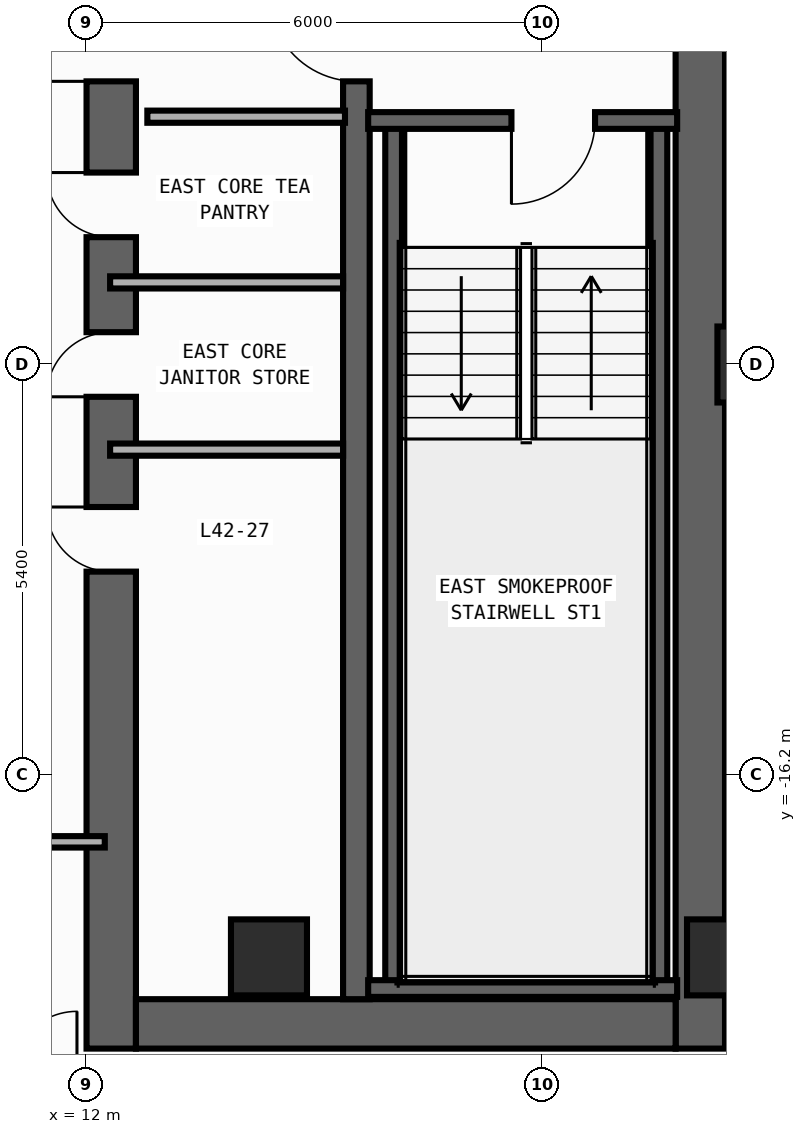
"""IFC4 building model, lengths in metres.
Left out: names, types, materials, properties, quantities, classifications, styles, units other than length and angle.
Written with IfcOpenShell. Run it as: python <this file> out.ifc"""

import sys

from ifc_helpers import new_model, si_unit, direction, frame, frame_2d, origin, origin_2d, place, context, subcontext, project, spatial, rectangle, extrude, element, fill, save


model = new_model("IFC4")
c1 = context("Model", 3, precision=1e-05, world=origin(), true_north=direction((0.0, 1.0)))
c2 = subcontext(c1, "Body", "Model", "MODEL_VIEW")
j1 = project(units=[si_unit("LENGTHUNIT", "METRE"), si_unit("PLANEANGLEUNIT", "RADIAN")], contexts=[c1])
p1 = place(None, origin())
s1 = spatial("IfcSite", under=j1, at=p1, CompositionType="ELEMENT")
p2 = place(p1, origin())
s2 = spatial("IfcBuilding", under=s1, at=p2, CompositionType="ELEMENT")
p3 = place(p2, frame((0.0, 0.0, 184.0)))
s3 = spatial("IfcBuildingStorey", under=s2, at=p3, CompositionType="ELEMENT", Elevation=184.0)
p4 = place(p3, frame((12.325, -19.8, 0.0), z_axis=(0.0, 0.0, 1.0), x_axis=(0.0, 1.0, 0.0)))
e1 = element("IfcWall", 1, at=p4, inside=s3, PredefinedType="SHEAR", context=c2, shape_type="SweptSolid", body=[
    extrude(rectangle(XDim=27.0, YDim=0.65, at=frame_2d((13.5, 0.0))), origin(), (0.0, 0.0, 1.0), 3.54),
])
p5 = place(p4, frame((23.05, 0.0, 0.0)))
e2 = element("IfcOpeningElement", 2, at=p5, cuts=e1, PredefinedType="OPENING", context=c2, shape_type="SweptSolid", body=[
    extrude(rectangle(XDim=1.1, YDim=2.2, at=frame_2d((0.55, 1.1))), frame((0.0, 0.335, 0.0), z_axis=(0.0, -1.0, 0.0), x_axis=(1.0, 0.0, 0.0)), (0.0, 0.0, 1.0), 0.67),
])
p6 = place(p4, frame((19.85, 0.0, 0.0)))
e3 = element("IfcOpeningElement", 3, at=p6, cuts=e1, PredefinedType="OPENING", context=c2, shape_type="SweptSolid", body=[
    extrude(rectangle(XDim=1.1, YDim=2.2, at=frame_2d((0.55, 1.1))), frame((0.0, 0.335, 0.0), z_axis=(0.0, -1.0, 0.0), x_axis=(1.0, 0.0, 0.0)), (0.0, 0.0, 1.0), 0.67),
])
p7 = place(p4, frame((16.65, 0.0, 0.0)))
e4 = element("IfcOpeningElement", 4, at=p7, cuts=e1, PredefinedType="OPENING", context=c2, shape_type="SweptSolid", body=[
    extrude(rectangle(XDim=1.1, YDim=2.2, at=frame_2d((0.55, 1.1))), frame((0.0, 0.335, 0.0), z_axis=(0.0, -1.0, 0.0), x_axis=(1.0, 0.0, 0.0)), (0.0, 0.0, 1.0), 0.67),
])
p8 = place(p4, frame((6.275, 0.0, 0.0)))
e5 = element("IfcOpeningElement", 5, at=p8, cuts=e1, PredefinedType="OPENING", context=c2, shape_type="SweptSolid", body=[
    extrude(rectangle(XDim=0.85, YDim=2.1, at=frame_2d((0.425, 1.05))), frame((0.0, 0.335, 0.0), z_axis=(0.0, -1.0, 0.0), x_axis=(1.0, 0.0, 0.0)), (0.0, 0.0, 1.0), 0.67),
])
p9 = place(p4, frame((8.575, 0.0, 0.0)))
e6 = element("IfcOpeningElement", 6, at=p9, cuts=e1, PredefinedType="OPENING", context=c2, shape_type="SweptSolid", body=[
    extrude(rectangle(XDim=0.85, YDim=2.1, at=frame_2d((0.425, 1.05))), frame((0.0, 0.335, 0.0), z_axis=(0.0, -1.0, 0.0), x_axis=(1.0, 0.0, 0.0)), (0.0, 0.0, 1.0), 0.67),
])
p10 = place(p4, frame((10.675, 0.0, 0.0)))
e7 = element("IfcOpeningElement", 7, at=p10, cuts=e1, PredefinedType="OPENING", context=c2, shape_type="SweptSolid", body=[
    extrude(rectangle(XDim=0.85, YDim=2.1, at=frame_2d((0.425, 1.05))), frame((0.0, 0.335, 0.0), z_axis=(0.0, -1.0, 0.0), x_axis=(1.0, 0.0, 0.0)), (0.0, 0.0, 1.0), 0.67),
])
p11 = place(p4, frame((12.725, 0.0, 0.0)))
e8 = element("IfcOpeningElement", 8, at=p11, cuts=e1, PredefinedType="OPENING", context=c2, shape_type="SweptSolid", body=[
    extrude(rectangle(XDim=1.15, YDim=2.2, at=frame_2d((0.575, 1.1))), frame((0.0, 0.335, 0.0), z_axis=(0.0, -1.0, 0.0), x_axis=(1.0, 0.0, 0.0)), (0.0, 0.0, 1.0), 0.67),
])
p12 = place(p4, frame((25.125, 0.0, 0.0)))
e9 = element("IfcOpeningElement", 9, at=p12, cuts=e1, PredefinedType="OPENING", context=c2, shape_type="SweptSolid", body=[
    extrude(rectangle(XDim=0.85, YDim=2.1, at=frame_2d((0.425, 1.05))), frame((0.0, 0.335, 0.0), z_axis=(0.0, -1.0, 0.0), x_axis=(1.0, 0.0, 0.0)), (0.0, 0.0, 1.0), 0.67),
])
p13 = place(p3, frame((20.075, -19.8, 0.0), z_axis=(0.0, 0.0, 1.0), x_axis=(0.0, 1.0, 0.0)))
e10 = element("IfcWall", 10, at=p13, inside=s3, PredefinedType="SHEAR", context=c2, shape_type="SweptSolid", body=[
    extrude(rectangle(XDim=27.0, YDim=0.65, at=frame_2d((13.5, 0.0))), origin(), (0.0, 0.0, 1.0), 3.54),
])
p14 = place(p3, frame((12.65, -19.475, 0.0), z_axis=(0.0, 0.0, 1.0), x_axis=(1.0, 0.0, 0.0)))
e11 = element("IfcWall", 11, at=p14, inside=s3, PredefinedType="SHEAR", context=c2, shape_type="SweptSolid", body=[
    extrude(rectangle(XDim=7.1, YDim=0.65, at=frame_2d((3.55, 0.0))), origin(), (0.0, 0.0, 1.0), 3.54),
])
p15 = place(p3, frame((15.55, -19.15, 0.0), z_axis=(0.0, 0.0, 1.0), x_axis=(0.0, 1.0, 0.0)))
e12 = element("IfcWall", 12, at=p15, inside=s3, PredefinedType="SHEAR", context=c2, shape_type="SweptSolid", body=[
    extrude(rectangle(XDim=25.7, YDim=0.35, at=frame_2d((12.85, 0.0))), origin(), (0.0, 0.0, 1.0), 3.54),
])
p16 = place(p15, frame((12.075, 0.0, 0.0)))
e13 = element("IfcOpeningElement", 13, at=p16, cuts=e12, PredefinedType="OPENING", context=c2, shape_type="SweptSolid", body=[
    extrude(rectangle(XDim=1.15, YDim=2.2, at=frame_2d((0.575, 1.1))), frame((0.0, 0.185, 0.0), z_axis=(0.0, -1.0, 0.0), x_axis=(1.0, 0.0, 0.0)), (0.0, 0.0, 1.0), 0.37),
])
p17 = place(p15, frame((24.475, 0.0, 0.0)))
e14 = element("IfcOpeningElement", 14, at=p17, cuts=e12, PredefinedType="OPENING", context=c2, shape_type="SweptSolid", body=[
    extrude(rectangle(XDim=0.85, YDim=2.1, at=frame_2d((0.425, 1.05))), frame((0.0, 0.185, 0.0), z_axis=(0.0, -1.0, 0.0), x_axis=(1.0, 0.0, 0.0)), (0.0, 0.0, 1.0), 0.37),
])
for number, where, z_axis, x_axis in (
    (15, (16.04, -19.01, 0.0), (0.0, 0.0, 1.0), (0.0, 1.0, 0.0)),
    (16, (19.53, -19.01, 0.0), (0.0, 0.0, 1.0), (0.0, 1.0, 0.0)),
):
    element("IfcWall", number, at=place(p3, frame(where, z_axis=z_axis, x_axis=x_axis)), inside=s3, PredefinedType="SHEAR", context=c2, shape_type="SweptSolid", body=[
        extrude(rectangle(XDim=11.42, YDim=0.22, at=frame_2d((5.71, 0.0))), origin(), (0.0, 0.0, 1.0), 3.54),
    ])
p18 = place(p3, frame((15.705, -19.01, 0.0), z_axis=(0.0, 0.0, 1.0), x_axis=(1.0, 0.0, 0.0)))
e17 = element("IfcWall", 17, at=p18, inside=s3, PredefinedType="SHEAR", context=c2, shape_type="SweptSolid", body=[
    extrude(rectangle(XDim=4.065, YDim=0.22, at=frame_2d((2.032, 0.0))), origin(), (0.0, 0.0, 1.0), 3.54),
])
p19 = place(p3, frame((19.77, -7.59, 0.0), z_axis=(0.0, 0.0, 1.0), x_axis=(-1.0, 0.0, 0.0)))
e18 = element("IfcWall", 18, at=p19, inside=s3, PredefinedType="SHEAR", context=c2, shape_type="SweptSolid", body=[
    extrude(rectangle(XDim=4.065, YDim=0.22, at=frame_2d((2.032, 0.0))), origin(), (0.0, 0.0, 1.0), 3.54),
])
p20 = place(p19, frame((1.08, 0.0, 0.0)))
e19 = element("IfcOpeningElement", 19, at=p20, cuts=e18, PredefinedType="OPENING", context=c2, shape_type="SweptSolid", body=[
    extrude(rectangle(XDim=1.1, YDim=2.2, at=frame_2d((0.55, 1.1))), frame((0.0, 0.12, 0.0), z_axis=(0.0, -1.0, 0.0), x_axis=(1.0, 0.0, 0.0)), (0.0, 0.0, 1.0), 0.24),
])
for number, where, z_axis, x_axis in (
    (20, (20.4, -18.6, 0.0), (0.0, 0.0, 1.0), (1.0, 0.0, 0.0)),
    (21, (14.4, -18.6, 0.0), (0.0, 0.0, 1.0), (1.0, 0.0, 0.0)),
    (22, (20.8, -10.8, 0.0), (0.0, 0.0, 1.0), (1.0, 0.0, 0.0)),
):
    element("IfcColumn", number, at=place(p3, frame(where, z_axis=z_axis, x_axis=x_axis)), inside=s3, PredefinedType="COLUMN", context=c2, shape_type="SweptSolid", body=[
        extrude(rectangle(XDim=1.0, YDim=1.0, at=origin_2d()), origin(), (0.0, 0.0, 1.0), 3.8),
    ])
p21 = place(p3, frame((12.8, -7.54, 0.0), z_axis=(0.0, 0.0, 1.0), x_axis=(1.0, 0.0, 0.0)))
e23 = element("IfcWall", 23, at=p21, inside=s3, PredefinedType="STANDARD", context=c2, shape_type="SweptSolid", body=[
    extrude(rectangle(XDim=2.6, YDim=0.16, at=frame_2d((1.3, 0.0))), origin(), (0.0, 0.0, 1.0), 3.54),
])
for number, where, z_axis, x_axis in (
    (24, (12.31, -11.92, 0.0), (0.0, 0.0, 1.0), (1.0, 0.0, 0.0)),
    (25, (12.31, -9.72, 0.0), (0.0, 0.0, 1.0), (1.0, 0.0, 0.0)),
):
    element("IfcWall", number, at=place(p3, frame(where, z_axis=z_axis, x_axis=x_axis)), inside=s3, PredefinedType="PARTITIONING", context=c2, shape_type="SweptSolid", body=[
        extrude(rectangle(XDim=3.065, YDim=0.16, at=frame_2d((1.532, 0.0))), origin(), (0.0, 0.0, 1.0), 3.54),
    ])
p22 = place(p3, frame((-0.96, -17.08, 0.0), z_axis=(0.0, 0.0, 1.0), x_axis=(1.0, 0.0, 0.0)))
e26 = element("IfcWall", 26, at=p22, inside=s3, PredefinedType="PARTITIONING", context=c2, shape_type="SweptSolid", body=[
    extrude(rectangle(XDim=13.2, YDim=0.15, at=frame_2d((6.6, 0.0))), origin(), (0.0, 0.0, 1.0), 3.54),
])
p23 = place(p22, frame((7.573, 0.0, 0.0)))
e27 = element("IfcOpeningElement", 27, at=p23, cuts=e26, PredefinedType="OPENING", context=c2, shape_type="SweptSolid", body=[
    extrude(rectangle(XDim=0.9, YDim=2.15, at=frame_2d((0.45, 1.075))), frame((0.0, 0.085, 0.0), z_axis=(0.0, -1.0, 0.0), x_axis=(1.0, 0.0, 0.0)), (0.0, 0.0, 1.0), 0.17),
])
p24 = place(p20, origin())
e28 = element("IfcDoor", 28, at=p24, inside=s3, OperationType="SINGLE_SWING_RIGHT", PredefinedType="DOOR", context=c2, shape_type="SweptSolid", body=[
    extrude(rectangle(XDim=1.1, YDim=2.2, at=frame_2d((0.55, 1.1))), frame((0.0, 0.025, 0.0), z_axis=(0.0, -1.0, 0.0), x_axis=(1.0, 0.0, 0.0)), (0.0, 0.0, 1.0), 0.05),
])
fill(e19, e28)
p25 = place(p8, origin())
e29 = element("IfcDoor", 29, at=p25, inside=s3, OperationType="SINGLE_SWING_RIGHT", PredefinedType="DOOR", context=c2, shape_type="SweptSolid", body=[
    extrude(rectangle(XDim=0.85, YDim=2.1, at=frame_2d((0.425, 1.05))), frame((0.0, 0.025, 0.0), z_axis=(0.0, -1.0, 0.0), x_axis=(1.0, 0.0, 0.0)), (0.0, 0.0, 1.0), 0.05),
])
fill(e5, e29)
p26 = place(p9, origin())
e30 = element("IfcDoor", 30, at=p26, inside=s3, OperationType="SINGLE_SWING_LEFT", PredefinedType="DOOR", context=c2, shape_type="SweptSolid", body=[
    extrude(rectangle(XDim=0.85, YDim=2.1, at=frame_2d((0.425, 1.05))), frame((0.0, 0.025, 0.0), z_axis=(0.0, -1.0, 0.0), x_axis=(1.0, 0.0, 0.0)), (0.0, 0.0, 1.0), 0.05),
])
fill(e6, e30)
p27 = place(p10, origin())
e31 = element("IfcDoor", 31, at=p27, inside=s3, OperationType="SINGLE_SWING_RIGHT", PredefinedType="DOOR", context=c2, shape_type="SweptSolid", body=[
    extrude(rectangle(XDim=0.85, YDim=2.1, at=frame_2d((0.425, 1.05))), frame((0.0, 0.025, 0.0), z_axis=(0.0, -1.0, 0.0), x_axis=(1.0, 0.0, 0.0)), (0.0, 0.0, 1.0), 0.05),
])
fill(e7, e31)
p28 = place(p11, origin())
e32 = element("IfcDoor", 32, at=p28, inside=s3, OperationType="SINGLE_SWING_LEFT", PredefinedType="DOOR", context=c2, shape_type="SweptSolid", body=[
    extrude(rectangle(XDim=1.15, YDim=2.2, at=frame_2d((0.575, 1.1))), frame((0.0, 0.025, 0.0), z_axis=(0.0, -1.0, 0.0), x_axis=(1.0, 0.0, 0.0)), (0.0, 0.0, 1.0), 0.05),
])
fill(e8, e32)
p29 = place(p16, origin())
e33 = element("IfcDoor", 33, at=p29, inside=s3, OperationType="SINGLE_SWING_RIGHT", PredefinedType="DOOR", context=c2, shape_type="SweptSolid", body=[
    extrude(rectangle(XDim=1.15, YDim=2.2, at=frame_2d((0.575, 1.1))), frame((0.0, 0.025, 0.0), z_axis=(0.0, -1.0, 0.0), x_axis=(1.0, 0.0, 0.0)), (0.0, 0.0, 1.0), 0.05),
])
fill(e13, e33)
save(model, sys.argv[1])
